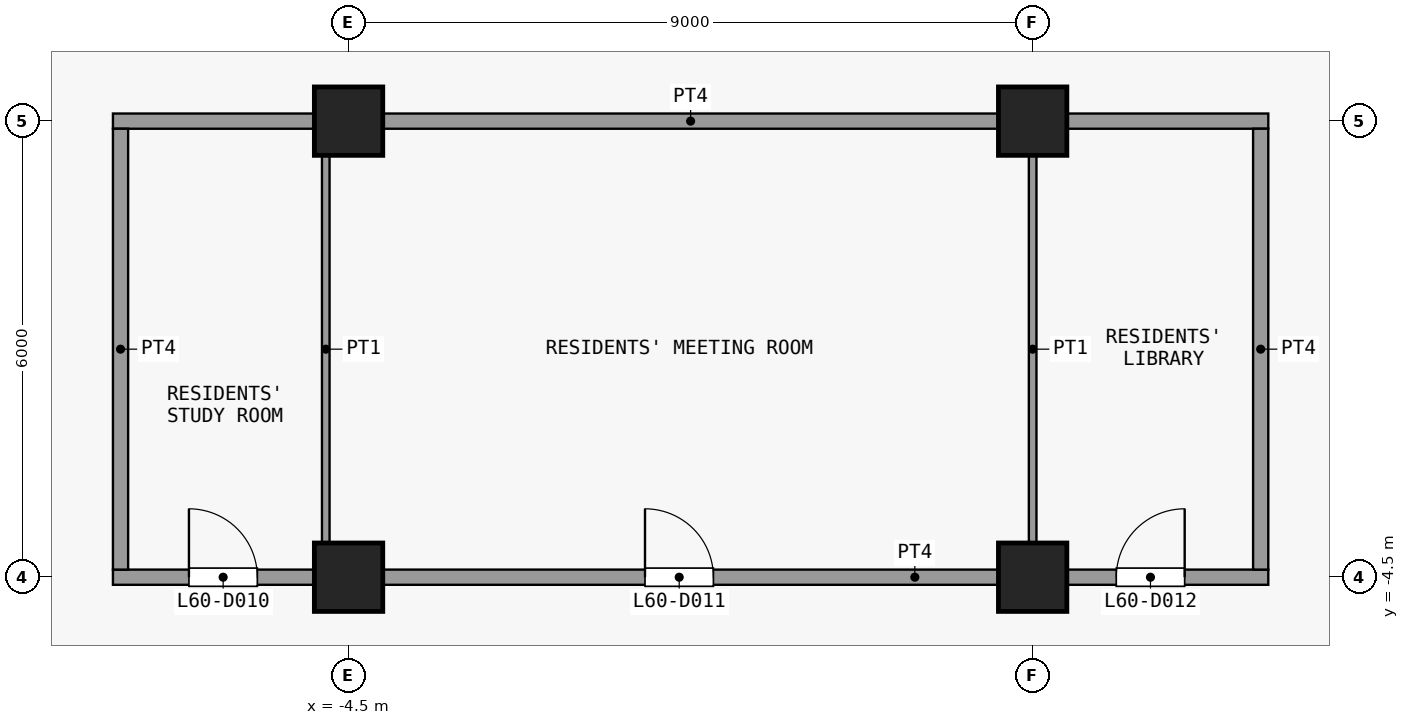
"""IFC4 building model, lengths in metres.
Left out: names, types, materials, properties, quantities, classifications, styles, units other than length and angle.
Written with IfcOpenShell. Run it as: python <this file> out.ifc"""

import sys

from ifc_helpers import new_model, si_unit, direction, frame, frame_2d, origin, origin_2d, place, context, subcontext, project, spatial, rectangle, extrude, element, fill, save


model = new_model("IFC4")
c1 = context("Model", 3, precision=1e-05, world=origin(), true_north=direction((0.0, 1.0)))
c2 = subcontext(c1, "Body", "Model", "MODEL_VIEW")
j1 = project(units=[si_unit("LENGTHUNIT", "METRE"), si_unit("PLANEANGLEUNIT", "RADIAN")], contexts=[c1])
p1 = place(None, origin())
s1 = spatial("IfcSite", under=j1, at=p1, CompositionType="ELEMENT")
p2 = place(p1, origin())
s2 = spatial("IfcBuilding", under=s1, at=p2, CompositionType="ELEMENT")
p3 = place(p2, frame((0.0, 0.0, 237.5)))
s3 = spatial("IfcBuildingStorey", under=s2, at=p3, CompositionType="ELEMENT", Elevation=237.5)
for number, where, z_axis, x_axis in (
    (1, (-4.5, -4.5, 0.0), (0.0, 0.0, 1.0), (1.0, 0.0, 0.0)),
    (2, (-4.5, 1.5, 0.0), (0.0, 0.0, 1.0), (1.0, 0.0, 0.0)),
    (3, (4.5, -4.5, 0.0), (0.0, 0.0, 1.0), (1.0, 0.0, 0.0)),
    (4, (4.5, 1.5, 0.0), (0.0, 0.0, 1.0), (1.0, 0.0, 0.0)),
):
    element("IfcColumn", number, at=place(p3, frame(where, z_axis=z_axis, x_axis=x_axis)), inside=s3, PredefinedType="COLUMN", context=c2, shape_type="SweptSolid", body=[
        extrude(rectangle(XDim=0.9, YDim=0.9, at=origin_2d()), origin(), (0.0, 0.0, 1.0), 3.6),
    ])
p4 = place(p3, frame((-7.6, -4.5, 0.0), z_axis=(0.0, 0.0, 1.0), x_axis=(1.0, 0.0, 0.0)))
e5 = element("IfcWall", 5, at=p4, inside=s3, PredefinedType="PARTITIONING", context=c2, shape_type="SweptSolid", body=[
    extrude(rectangle(XDim=15.2, YDim=0.2, at=frame_2d((7.6, 0.0))), origin(), (0.0, 0.0, 1.0), 3.3),
])
p5 = place(p4, frame((1.0, 0.0, 0.0)))
e6 = element("IfcOpeningElement", 6, at=p5, cuts=e5, PredefinedType="OPENING", context=c2, shape_type="SweptSolid", body=[
    extrude(rectangle(XDim=0.9, YDim=2.1, at=frame_2d((0.45, 1.05))), frame((0.0, 0.11, 0.0), z_axis=(0.0, -1.0, 0.0), x_axis=(1.0, 0.0, 0.0)), (0.0, 0.0, 1.0), 0.22),
])
p6 = place(p4, frame((7.0, 0.0, 0.0)))
e7 = element("IfcOpeningElement", 7, at=p6, cuts=e5, PredefinedType="OPENING", context=c2, shape_type="SweptSolid", body=[
    extrude(rectangle(XDim=0.9, YDim=2.1, at=frame_2d((0.45, 1.05))), frame((0.0, 0.11, 0.0), z_axis=(0.0, -1.0, 0.0), x_axis=(1.0, 0.0, 0.0)), (0.0, 0.0, 1.0), 0.22),
])
p7 = place(p4, frame((13.2, 0.0, 0.0)))
e8 = element("IfcOpeningElement", 8, at=p7, cuts=e5, PredefinedType="OPENING", context=c2, shape_type="SweptSolid", body=[
    extrude(rectangle(XDim=0.9, YDim=2.1, at=frame_2d((0.45, 1.05))), frame((0.0, 0.11, 0.0), z_axis=(0.0, -1.0, 0.0), x_axis=(1.0, 0.0, 0.0)), (0.0, 0.0, 1.0), 0.22),
])
p8 = place(p3, frame((-7.6, 1.5, 0.0), z_axis=(0.0, 0.0, 1.0), x_axis=(1.0, 0.0, 0.0)))
e9 = element("IfcWall", 9, at=p8, inside=s3, PredefinedType="PARTITIONING", context=c2, shape_type="SweptSolid", body=[
    extrude(rectangle(XDim=15.2, YDim=0.2, at=frame_2d((7.6, 0.0))), origin(), (0.0, 0.0, 1.0), 3.3),
])
p9 = place(p3, frame((-7.5, -4.4, 0.0), z_axis=(0.0, 0.0, 1.0), x_axis=(0.0, 1.0, 0.0)))
e10 = element("IfcWall", 10, at=p9, inside=s3, PredefinedType="PARTITIONING", context=c2, shape_type="SweptSolid", body=[
    extrude(rectangle(XDim=5.8, YDim=0.2, at=frame_2d((2.9, 0.0))), origin(), (0.0, 0.0, 1.0), 3.3),
])
for number, where, z_axis, x_axis in (
    (11, (-4.8, -4.4, 0.0), (0.0, 0.0, 1.0), (0.0, 1.0, 0.0)),
    (12, (4.5, -4.4, 0.0), (0.0, 0.0, 1.0), (0.0, 1.0, 0.0)),
):
    element("IfcWall", number, at=place(p3, frame(where, z_axis=z_axis, x_axis=x_axis)), inside=s3, PredefinedType="PARTITIONING", context=c2, shape_type="SweptSolid", body=[
        extrude(rectangle(XDim=5.8, YDim=0.1, at=frame_2d((2.9, 0.0))), origin(), (0.0, 0.0, 1.0), 3.3),
    ])
p10 = place(p3, frame((7.5, -4.4, 0.0), z_axis=(0.0, 0.0, 1.0), x_axis=(0.0, 1.0, 0.0)))
e13 = element("IfcWall", 13, at=p10, inside=s3, PredefinedType="PARTITIONING", context=c2, shape_type="SweptSolid", body=[
    extrude(rectangle(XDim=5.8, YDim=0.2, at=frame_2d((2.9, 0.0))), origin(), (0.0, 0.0, 1.0), 3.3),
])
p11 = place(p5, origin())
e14 = element("IfcDoor", 14, at=p11, inside=s3, OperationType="SINGLE_SWING_RIGHT", PredefinedType="DOOR", context=c2, shape_type="SweptSolid", body=[
    extrude(rectangle(XDim=0.9, YDim=2.1, at=frame_2d((0.45, 1.05))), frame((0.0, 0.025, 0.0), z_axis=(0.0, -1.0, 0.0), x_axis=(1.0, 0.0, 0.0)), (0.0, 0.0, 1.0), 0.05),
])
fill(e6, e14)
p12 = place(p6, origin())
e15 = element("IfcDoor", 15, at=p12, inside=s3, OperationType="SINGLE_SWING_RIGHT", PredefinedType="DOOR", context=c2, shape_type="SweptSolid", body=[
    extrude(rectangle(XDim=0.9, YDim=2.1, at=frame_2d((0.45, 1.05))), frame((0.0, 0.025, 0.0), z_axis=(0.0, -1.0, 0.0), x_axis=(1.0, 0.0, 0.0)), (0.0, 0.0, 1.0), 0.05),
])
fill(e7, e15)
p13 = place(p7, origin())
e16 = element("IfcDoor", 16, at=p13, inside=s3, OperationType="SINGLE_SWING_LEFT", PredefinedType="DOOR", context=c2, shape_type="SweptSolid", body=[
    extrude(rectangle(XDim=0.9, YDim=2.1, at=frame_2d((0.45, 1.05))), frame((0.0, 0.025, 0.0), z_axis=(0.0, -1.0, 0.0), x_axis=(1.0, 0.0, 0.0)), (0.0, 0.0, 1.0), 0.05),
])
fill(e8, e16)
save(model, sys.argv[1])
